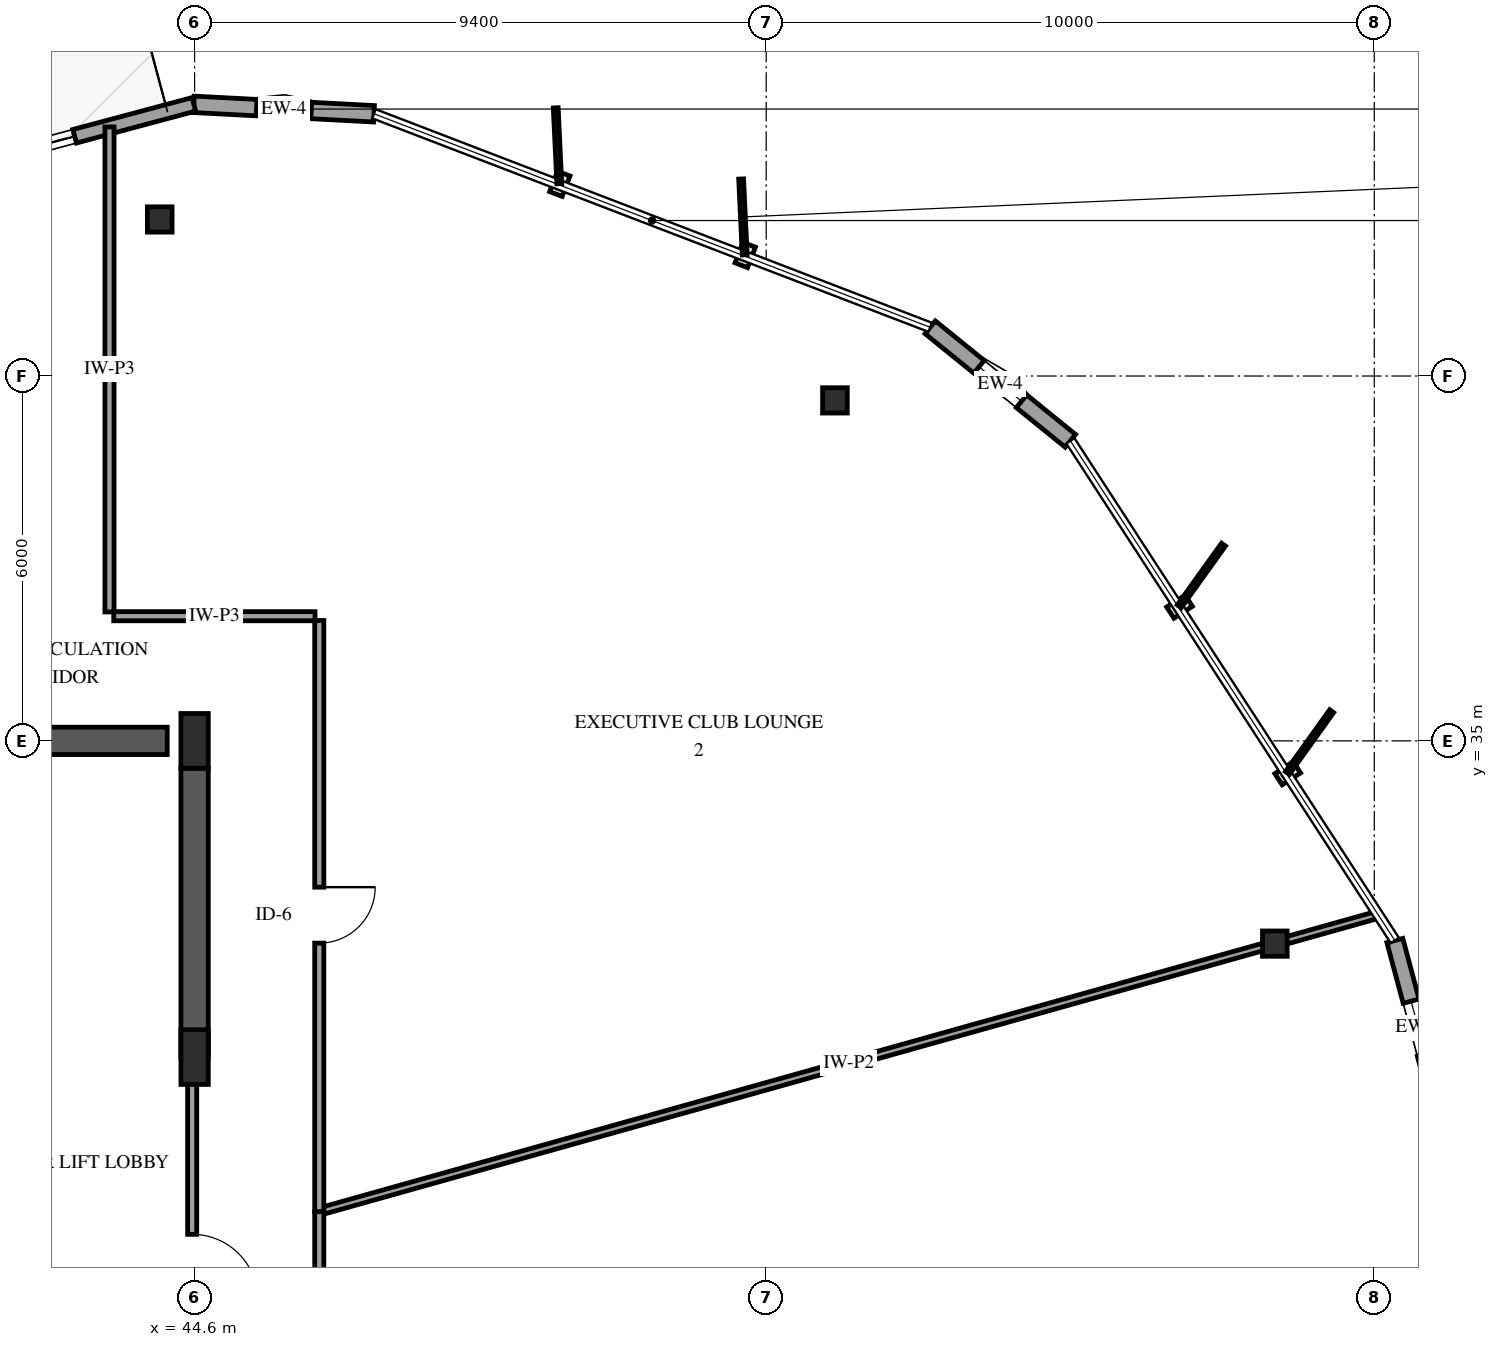
"""IFC4 building model, lengths in metres.
Left out: names, types, materials, properties, quantities, classifications, styles, units other than length and angle.
Written with IfcOpenShell. Run it as: python <this file> out.ifc"""

import sys

from ifc_helpers import new_model, si_unit, direction, frame, frame_2d, origin, origin_2d, place, context, subcontext, project, spatial, rectangle, i_section, extrude, element, fill, save


model = new_model("IFC4")
c1 = context("Model", 3, precision=1e-05, world=origin(), true_north=direction((0.0, 1.0)))
c2 = subcontext(c1, "Body", "Model", "MODEL_VIEW")
j1 = project(units=[si_unit("LENGTHUNIT", "METRE"), si_unit("PLANEANGLEUNIT", "RADIAN")], contexts=[c1])
p1 = place(None, origin())
s1 = spatial("IfcSite", under=j1, at=p1, CompositionType="ELEMENT")
p2 = place(p1, origin())
s2 = spatial("IfcBuilding", under=s1, at=p2, CompositionType="ELEMENT")
p3 = place(p2, frame((0.0, 0.0, 219.4)))
s3 = spatial("IfcBuildingStorey", under=s2, at=p3, CompositionType="ELEMENT", Elevation=219.4)
p4 = place(p3, frame((41.3, 35.0, 0.0), z_axis=(0.0, 0.0, 1.0), x_axis=(1.0, 0.0, 0.0)))
e1 = element("IfcWall", 1, at=p4, inside=s3, PredefinedType="SHEAR", context=c2, shape_type="SweptSolid", body=[
    extrude(rectangle(XDim=2.85, YDim=0.45, at=frame_2d((1.425, 0.0))), origin(), (0.0, 0.0, 1.0), 3.6),
])
p5 = place(p3, frame((44.6, 29.8, 0.0), z_axis=(0.0, 0.0, 1.0), x_axis=(0.0, 1.0, 0.0)))
e2 = element("IfcWall", 2, at=p5, inside=s3, PredefinedType="SHEAR", context=c2, shape_type="SweptSolid", body=[
    extrude(rectangle(XDim=4.75, YDim=0.45, at=frame_2d((2.375, 0.0))), origin(), (0.0, 0.0, 1.0), 3.6),
])
for number, where, z_axis, x_axis in (
    (3, (44.6, 29.8, 0.0), (0.0, 0.0, 1.0), (1.0, 0.0, 0.0)),
    (4, (44.6, 35.0, 0.0), (0.0, 0.0, 1.0), (1.0, 0.0, 0.0)),
):
    element("IfcColumn", number, at=place(p3, frame(where, z_axis=z_axis, x_axis=x_axis)), inside=s3, PredefinedType="PILASTER", context=c2, shape_type="SweptSolid", body=[
        extrude(rectangle(XDim=0.45, YDim=0.9, at=origin_2d()), origin(), (0.0, 0.0, 1.0), 3.6),
    ])
for number, where, z_axis, x_axis in (
    (5, (62.365, 31.666, 0.0), (0.0, 0.0, 1.0), (1.0, 0.0, 0.0)),
    (6, (55.13, 40.599, 0.0), (0.0, 0.0, 1.0), (1.0, 0.0, 0.0)),
    (7, (44.027, 43.574, 0.0), (0.0, 0.0, 1.0), (1.0, 0.0, 0.0)),
):
    element("IfcColumn", number, at=place(p3, frame(where, z_axis=z_axis, x_axis=x_axis)), inside=s3, PredefinedType="COLUMN", context=c2, shape_type="SweptSolid", body=[
        extrude(i_section(OverallWidth=0.406, OverallDepth=0.416, WebThickness=0.03, FlangeThickness=0.048, FilletRadius=0.038, at=origin_2d()), origin(), (0.0, 0.0, 1.0), 3.6),
    ])
p6 = place(p3, frame((47.55, 45.312, 0.0), z_axis=(0.0, 0.0, 1.0), x_axis=(-0.998629173391, 0.05234285102, 0.0)))
e8 = element("IfcWall", 8, at=p6, inside=s3, PredefinedType="SOLIDWALL", context=c2, shape_type="SweptSolid", body=[
    extrude(rectangle(XDim=2.967, YDim=0.27, at=frame_2d((1.483, 0.0))), origin(), (0.0, 0.0, 1.0), 2.679),
])
p7 = place(p6, frame((1.033, 0.0, 0.75)))
e9 = element("IfcOpeningElement", 9, at=p7, cuts=e8, PredefinedType="OPENING", context=c2, shape_type="SweptSolid", body=[
    extrude(rectangle(XDim=0.9, YDim=1.5, at=frame_2d((0.45, 0.75))), frame((0.0, 0.145, 0.0), z_axis=(0.0, -1.0, 0.0), x_axis=(1.0, 0.0, 0.0)), (0.0, 0.0, 1.0), 0.29),
])
p8 = place(p3, frame((44.587, 45.468, 0.0), z_axis=(0.0, 0.0, 1.0), x_axis=(-0.965924471327, -0.258824101839, 0.0)))
e10 = element("IfcWall", 10, at=p8, inside=s3, PredefinedType="SOLIDWALL", context=c2, shape_type="SweptSolid", body=[
    extrude(rectangle(XDim=9.798, YDim=0.23, at=frame_2d((4.899, 0.0))), origin(), (0.0, 0.0, 1.0), 2.679),
])
p9 = place(p8, frame((4.399, 0.0, 0.0)))
e11 = element("IfcOpeningElement", 11, at=p9, cuts=e10, PredefinedType="OPENING", context=c2, shape_type="SweptSolid", body=[
    extrude(rectangle(XDim=1.0, YDim=2.15, at=frame_2d((0.5, 1.075))), frame((0.0, 0.125, 0.0), z_axis=(0.0, -1.0, 0.0), x_axis=(1.0, 0.0, 0.0)), (0.0, 0.0, 1.0), 0.25),
])
p10 = place(p8, frame((2.029, 0.0, 0.72)))
e12 = element("IfcOpeningElement", 12, at=p10, cuts=e10, PredefinedType="OPENING", context=c2, shape_type="SweptSolid", body=[
    extrude(rectangle(XDim=1.2, YDim=1.6, at=frame_2d((0.6, 0.8))), frame((0.0, 0.125, 0.0), z_axis=(0.0, -1.0, 0.0), x_axis=(1.0, 0.0, 0.0)), (0.0, 0.0, 1.0), 0.25),
])
p11 = place(p8, frame((6.039, 0.0, 0.72)))
e13 = element("IfcOpeningElement", 13, at=p11, cuts=e10, PredefinedType="OPENING", context=c2, shape_type="SweptSolid", body=[
    extrude(rectangle(XDim=1.2, YDim=1.6, at=frame_2d((0.6, 0.8))), frame((0.0, 0.125, 0.0), z_axis=(0.0, -1.0, 0.0), x_axis=(1.0, 0.0, 0.0)), (0.0, 0.0, 1.0), 0.25),
])
p12 = place(p3, frame((65.106, 28.852, 0.0), z_axis=(0.0, 0.0, 1.0), x_axis=(-0.258825213075, 0.965924173565, 0.0)))
e14 = element("IfcWall", 14, at=p12, inside=s3, PredefinedType="SOLIDWALL", context=c2, shape_type="SweptSolid", body=[
    extrude(rectangle(XDim=2.967, YDim=0.27, at=frame_2d((1.483, 0.0))), origin(), (0.0, 0.0, 1.0), 2.679),
])
p13 = place(p12, frame((1.033, 0.0, 0.75)))
e15 = element("IfcOpeningElement", 15, at=p13, cuts=e14, PredefinedType="OPENING", context=c2, shape_type="SweptSolid", body=[
    extrude(rectangle(XDim=0.9, YDim=1.5, at=frame_2d((0.45, 0.75))), frame((0.0, 0.145, 0.0), z_axis=(0.0, -1.0, 0.0), x_axis=(1.0, 0.0, 0.0)), (0.0, 0.0, 1.0), 0.29),
])
p14 = place(p3, frame((59.002, 39.934, 0.0), z_axis=(0.0, 0.0, 1.0), x_axis=(-0.777137534132, 0.629330797787, 0.0)))
e16 = element("IfcWall", 16, at=p14, inside=s3, PredefinedType="SOLIDWALL", context=c2, shape_type="SweptSolid", body=[
    extrude(rectangle(XDim=2.967, YDim=0.27, at=frame_2d((1.483, 0.0))), origin(), (0.0, 0.0, 1.0), 2.679),
])
p15 = place(p14, frame((1.033, 0.0, 0.75)))
e17 = element("IfcOpeningElement", 17, at=p15, cuts=e16, PredefinedType="OPENING", context=c2, shape_type="SweptSolid", body=[
    extrude(rectangle(XDim=0.9, YDim=1.5, at=frame_2d((0.45, 0.75))), frame((0.0, 0.145, 0.0), z_axis=(0.0, -1.0, 0.0), x_axis=(1.0, 0.0, 0.0)), (0.0, 0.0, 1.0), 0.29),
])
p16 = place(p3, frame((64.063, 32.142, 0.0), z_axis=(0.0, 0.0, 1.0), x_axis=(-0.962843769861, -0.270059021032, 0.0)))
e18 = element("IfcWall", 18, at=p16, inside=s3, PredefinedType="PARTITIONING", context=c2, shape_type="SweptSolid", body=[
    extrude(rectangle(XDim=18.085, YDim=0.12, at=frame_2d((9.042, 0.0))), origin(), (0.0, 0.0, 1.0), 3.3),
])
p17 = place(p3, frame((46.65, 27.258, 0.0), z_axis=(0.0, 0.0, 1.0), x_axis=(0.0, -1.0, 0.0)))
e19 = element("IfcWall", 19, at=p17, inside=s3, PredefinedType="PARTITIONING", context=c2, shape_type="SweptSolid", body=[
    extrude(rectangle(XDim=14.238, YDim=0.15, at=frame_2d((7.119, 0.0))), origin(), (0.0, 0.0, 1.0), 3.3),
])
p18 = place(p17, frame((6.644, 0.0, 0.0)))
e20 = element("IfcOpeningElement", 20, at=p18, cuts=e19, PredefinedType="OPENING", context=c2, shape_type="SweptSolid", body=[
    extrude(rectangle(XDim=0.92, YDim=2.12, at=frame_2d((0.46, 1.06))), frame((0.0, 0.085, 0.0), z_axis=(0.0, -1.0, 0.0), x_axis=(1.0, 0.0, 0.0)), (0.0, 0.0, 1.0), 0.17),
])
p19 = place(p3, frame((46.65, 36.98, 0.0), z_axis=(0.0, 0.0, 1.0), x_axis=(0.0, -1.0, 0.0)))
e21 = element("IfcWall", 21, at=p19, inside=s3, PredefinedType="PARTITIONING", context=c2, shape_type="SweptSolid", body=[
    extrude(rectangle(XDim=9.722, YDim=0.15, at=frame_2d((4.861, 0.0))), origin(), (0.0, 0.0, 1.0), 3.3),
])
p20 = place(p19, frame((4.386, 0.0, 0.0)))
e22 = element("IfcOpeningElement", 22, at=p20, cuts=e21, PredefinedType="OPENING", context=c2, shape_type="SweptSolid", body=[
    extrude(rectangle(XDim=0.92, YDim=2.12, at=frame_2d((0.46, 1.06))), frame((0.0, 0.085, 0.0), z_axis=(0.0, -1.0, 0.0), x_axis=(1.0, 0.0, 0.0)), (0.0, 0.0, 1.0), 0.17),
])
p21 = place(p3, frame((43.2, 45.096, 0.0), z_axis=(0.0, 0.0, 1.0), x_axis=(0.0, -1.0, 0.0)))
e23 = element("IfcWall", 23, at=p21, inside=s3, PredefinedType="PARTITIONING", context=c2, shape_type="SweptSolid", body=[
    extrude(rectangle(XDim=7.976, YDim=0.15, at=frame_2d((3.988, 0.0))), origin(), (0.0, 0.0, 1.0), 2.595),
])
p22 = place(p3, frame((44.56, 29.8, 0.0), z_axis=(0.0, 0.0, 1.0), x_axis=(0.0, -1.0, 0.0)))
e24 = element("IfcWall", 24, at=p22, inside=s3, PredefinedType="PARTITIONING", context=c2, shape_type="SweptSolid", body=[
    extrude(rectangle(XDim=6.91, YDim=0.15, at=frame_2d((3.455, 0.0))), origin(), (0.0, 0.0, 1.0), 2.34),
])
p23 = place(p22, frame((2.915, 0.0, 0.0)))
e25 = element("IfcOpeningElement", 25, at=p23, cuts=e24, PredefinedType="OPENING", context=c2, shape_type="SweptSolid", body=[
    extrude(rectangle(XDim=1.08, YDim=2.15, at=frame_2d((0.54, 1.075))), frame((0.0, 0.085, 0.0), z_axis=(0.0, -1.0, 0.0), x_axis=(1.0, 0.0, 0.0)), (0.0, 0.0, 1.0), 0.17),
])
p24 = place(p3, frame((43.27, 37.05, 0.0), z_axis=(0.0, 0.0, 1.0), x_axis=(1.0, 0.0, 0.0)))
e26 = element("IfcWall", 26, at=p24, inside=s3, PredefinedType="PARTITIONING", context=c2, shape_type="SweptSolid", body=[
    extrude(rectangle(XDim=3.31, YDim=0.15, at=frame_2d((1.655, 0.0))), origin(), (0.0, 0.0, 1.0), 3.3),
])
p25 = place(p7, origin())
e27 = element("IfcWindow", 27, at=p25, inside=s3, PartitioningType="SINGLE_PANEL", PredefinedType="WINDOW", context=c2, shape_type="SweptSolid", body=[
    extrude(rectangle(XDim=0.9, YDim=1.5, at=frame_2d((0.45, 0.75))), frame((0.0, 0.03, 0.0), z_axis=(0.0, -1.0, 0.0), x_axis=(1.0, 0.0, 0.0)), (0.0, 0.0, 1.0), 0.06),
])
fill(e9, e27)
p26 = place(p10, origin())
e28 = element("IfcWindow", 28, at=p26, inside=s3, PartitioningType="SINGLE_PANEL", PredefinedType="WINDOW", context=c2, shape_type="SweptSolid", body=[
    extrude(rectangle(XDim=1.2, YDim=1.6, at=frame_2d((0.6, 0.8))), frame((0.0, 0.03, 0.0), z_axis=(0.0, -1.0, 0.0), x_axis=(1.0, 0.0, 0.0)), (0.0, 0.0, 1.0), 0.06),
])
fill(e12, e28)
p27 = place(p13, origin())
e29 = element("IfcWindow", 29, at=p27, inside=s3, PartitioningType="SINGLE_PANEL", PredefinedType="WINDOW", context=c2, shape_type="SweptSolid", body=[
    extrude(rectangle(XDim=0.9, YDim=1.5, at=frame_2d((0.45, 0.75))), frame((0.0, 0.03, 0.0), z_axis=(0.0, -1.0, 0.0), x_axis=(1.0, 0.0, 0.0)), (0.0, 0.0, 1.0), 0.06),
])
fill(e15, e29)
p28 = place(p15, origin())
e30 = element("IfcWindow", 30, at=p28, inside=s3, PartitioningType="SINGLE_PANEL", PredefinedType="WINDOW", context=c2, shape_type="SweptSolid", body=[
    extrude(rectangle(XDim=0.9, YDim=1.5, at=frame_2d((0.45, 0.75))), frame((0.0, 0.03, 0.0), z_axis=(0.0, -1.0, 0.0), x_axis=(1.0, 0.0, 0.0)), (0.0, 0.0, 1.0), 0.06),
])
fill(e17, e30)
p29 = place(p20, origin())
e31 = element("IfcDoor", 31, at=p29, inside=s3, OperationType="SINGLE_SWING_LEFT", PredefinedType="DOOR", context=c2, shape_type="SweptSolid", body=[
    extrude(rectangle(XDim=0.92, YDim=2.12, at=frame_2d((0.46, 1.06))), frame((0.0, 0.025, 0.0), z_axis=(0.0, -1.0, 0.0), x_axis=(1.0, 0.0, 0.0)), (0.0, 0.0, 1.0), 0.05),
])
fill(e22, e31)
p30 = place(p23, origin())
e32 = element("IfcDoor", 32, at=p30, inside=s3, OperationType="SINGLE_SWING_RIGHT", PredefinedType="DOOR", context=c2, shape_type="SweptSolid", body=[
    extrude(rectangle(XDim=1.08, YDim=2.15, at=frame_2d((0.54, 1.075))), frame((0.0, 0.025, 0.0), z_axis=(0.0, -1.0, 0.0), x_axis=(1.0, 0.0, 0.0)), (0.0, 0.0, 1.0), 0.05),
])
fill(e25, e32)
save(model, sys.argv[1])
